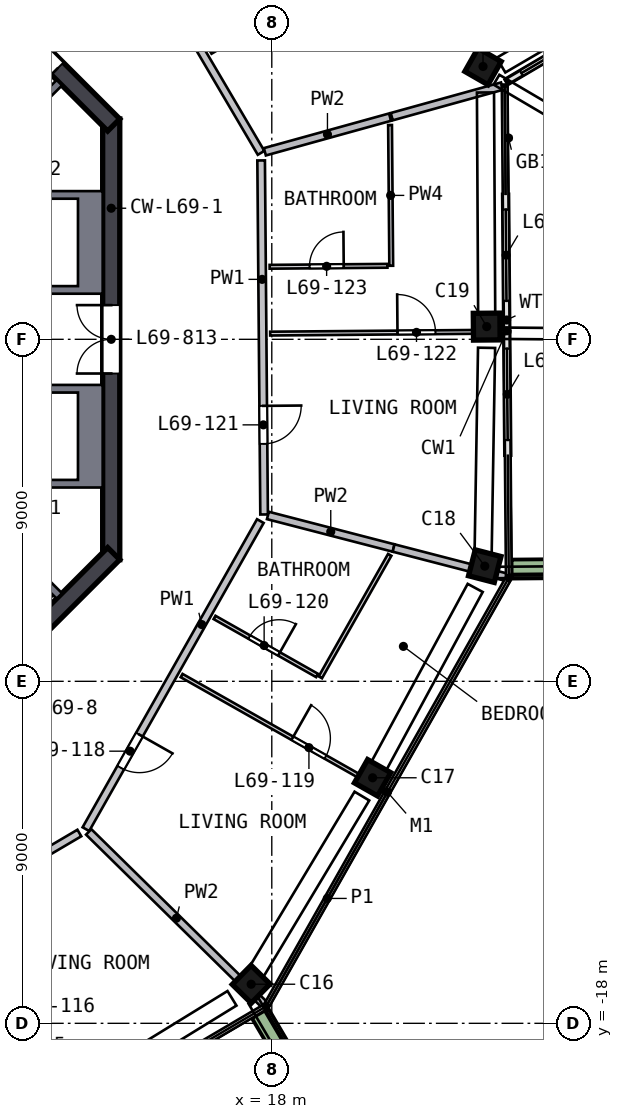
"""IFC4 building model, lengths in metres.
Left out: names, types, materials, properties, quantities, classifications, styles, units other than length and angle.
Written with IfcOpenShell. Run it as: python <this file> out.ifc"""

import sys

from ifc_helpers import new_model, si_unit, direction, frame, frame_2d, origin, origin_2d, place, context, subcontext, project, spatial, polyline, rectangle, outline, extrude, element, fill, save


model = new_model("IFC4")
c1 = context("Model", 3, precision=1e-05, world=origin(), true_north=direction((0.0, 1.0)))
c2 = subcontext(c1, "Body", "Model", "MODEL_VIEW")
j1 = project(units=[si_unit("LENGTHUNIT", "METRE"), si_unit("PLANEANGLEUNIT", "RADIAN")], contexts=[c1])
p1 = place(None, origin())
s1 = spatial("IfcSite", under=j1, at=p1, CompositionType="ELEMENT")
p2 = place(p1, origin())
s2 = spatial("IfcBuilding", under=s1, at=p2, CompositionType="ELEMENT")
p3 = place(p2, frame((0.0, 0.0, 281.0)))
s3 = spatial("IfcBuildingStorey", under=s2, at=p3, CompositionType="ELEMENT", Elevation=281.0)
p4 = place(p3, frame((17.36, -17.072, 0.0), z_axis=(0.080504772, 0.083241478, 0.993272288), x_axis=(-0.696552232, -0.70810012, 0.115798136)))
e1 = element("IfcColumn", 1, at=p4, inside=s3, PredefinedType="COLUMN", context=c2, shape_type="SweptSolid", body=[
    extrude(rectangle(XDim=0.7, YDim=0.7, at=origin_2d()), origin(), (0.0, 0.0, 1.0), 3.211),
])
p5 = place(p3, frame((20.587, -11.657, 0.0), z_axis=(0.054603093, 0.098331196, 0.993654607), x_axis=(0.489744386, 0.864581294, -0.112470541)))
e2 = element("IfcColumn", 2, at=p5, inside=s3, PredefinedType="COLUMN", context=c2, shape_type="SweptSolid", body=[
    extrude(rectangle(XDim=0.7, YDim=0.7, at=origin_2d()), origin(), (0.0, 0.0, 1.0), 3.21),
])
p6 = place(p3, frame((23.57, -6.104, 0.0), z_axis=(0.028051466, 0.112281885, 0.99328037), x_axis=(-0.248925653, -0.96158352, 0.115728794)))
e3 = element("IfcColumn", 3, at=p6, inside=s3, PredefinedType="COLUMN", context=c2, shape_type="SweptSolid", body=[
    extrude(rectangle(XDim=0.7, YDim=0.7, at=origin_2d()), origin(), (0.0, 0.0, 1.0), 3.211),
])
p7 = place(p3, frame((23.657, 0.198, 0.0), z_axis=(-0.001901218, 0.112476061, 0.993652616), x_axis=(-0.008362644, 0.993617878, -0.11248813)))
e4 = element("IfcColumn", 4, at=p7, inside=s3, PredefinedType="COLUMN", context=c2, shape_type="SweptSolid", body=[
    extrude(rectangle(XDim=0.7, YDim=0.7, at=origin_2d()), origin(), (0.0, 0.0, 1.0), 3.21),
])
p8 = place(p3, frame((23.6, 7.044, 0.0), z_axis=(-0.034431763, 0.111884229, 0.993124551), x_axis=(-0.497018974, -0.864033933, 0.080109318)))
e5 = element("IfcColumn", 5, at=p8, inside=s3, PredefinedType="COLUMN", context=c2, shape_type="SweptSolid", body=[
    extrude(rectangle(XDim=0.7, YDim=0.7, at=origin_2d()), origin(), (0.0, 0.0, 1.0), 3.212),
])
p9 = place(p3, frame((13.775, -5.799, 0.0), z_axis=(0.0, 0.0, 1.0), x_axis=(0.0, 1.0, 0.0)))
e6 = element("IfcWall", 6, at=p9, inside=s3, PredefinedType="SHEAR", context=c2, shape_type="SweptSolid", body=[
    extrude(rectangle(XDim=11.598, YDim=0.45, at=frame_2d((5.799, 0.0))), origin(), (0.0, 0.0, 1.0), 3.5),
])
p10 = place(p9, frame((4.899, 0.0, 0.0)))
e7 = element("IfcOpeningElement", 7, at=p10, cuts=e6, PredefinedType="OPENING", context=c2, shape_type="SweptSolid", body=[
    extrude(rectangle(XDim=1.8, YDim=2.1, at=frame_2d((0.9, 1.05))), frame((0.0, 0.235, 0.0), z_axis=(0.0, -1.0, 0.0), x_axis=(1.0, 0.0, 0.0)), (0.0, 0.0, 1.0), 0.47),
])
p11 = place(p3, frame((13.841, 5.64, 0.0), z_axis=(0.0, 0.0, 1.0), x_axis=(-0.707106781, 0.707106781, 0.0)))
e8 = element("IfcWall", 8, at=p11, inside=s3, PredefinedType="SHEAR", context=c2, shape_type="SweptSolid", body=[
    extrude(rectangle(XDim=11.598, YDim=0.45, at=frame_2d((5.799, 0.0))), origin(), (0.0, 0.0, 1.0), 3.5),
])
p12 = place(p11, frame((2.099, 0.0, 0.0)))
e9 = element("IfcOpeningElement", 9, at=p12, cuts=e8, PredefinedType="OPENING", context=c2, shape_type="SweptSolid", body=[
    extrude(rectangle(XDim=1.2, YDim=2.1, at=frame_2d((0.6, 1.05))), frame((0.0, 0.235, 0.0), z_axis=(0.0, -1.0, 0.0), x_axis=(1.0, 0.0, 0.0)), (0.0, 0.0, 1.0), 0.47),
])
p13 = place(p3, frame((5.64, -13.841, 0.0), z_axis=(0.0, 0.0, 1.0), x_axis=(0.707106781, 0.707106781, 0.0)))
e10 = element("IfcWall", 10, at=p13, inside=s3, PredefinedType="SHEAR", context=c2, shape_type="SweptSolid", body=[
    extrude(rectangle(XDim=11.598, YDim=0.45, at=frame_2d((5.799, 0.0))), origin(), (0.0, 0.0, 1.0), 3.5),
])
p14 = place(p13, frame((2.099, 0.0, 0.0)))
e11 = element("IfcOpeningElement", 11, at=p14, cuts=e10, PredefinedType="OPENING", context=c2, shape_type="SweptSolid", body=[
    extrude(rectangle(XDim=1.2, YDim=2.1, at=frame_2d((0.6, 1.05))), frame((0.0, 0.235, 0.0), z_axis=(0.0, -1.0, 0.0), x_axis=(1.0, 0.0, 0.0)), (0.0, 0.0, 1.0), 0.47),
])
p15 = place(p3, frame((24.21, -3.047, 0.0), z_axis=(0.0, 0.0, 1.0), x_axis=(-0.008413164, 0.999964609, 0.0)))
e12 = element("IfcWall", 12, at=p15, inside=s3, PredefinedType="SOLIDWALL", context=c2, shape_type="SweptSolid", body=[
    extrude(rectangle(XDim=3.25, YDim=0.15, at=frame_2d((1.625, 0.0))), origin(), (0.0, 0.0, 1.0), 2.525),
])
p16 = place(p15, frame((0.4, 0.0, 0.0)))
e13 = element("IfcOpeningElement", 13, at=p16, cuts=e12, PredefinedType="OPENING", context=c2, shape_type="SweptSolid", body=[
    extrude(rectangle(XDim=2.4, YDim=2.4, at=frame_2d((1.2, 1.2))), frame((0.0, 0.085, 0.0), z_axis=(0.0, -1.0, 0.0), x_axis=(1.0, 0.0, 0.0)), (0.0, 0.0, 1.0), 0.17),
])
p17 = place(p3, frame((24.182, 0.203, 0.0), z_axis=(0.0, 0.0, 1.0), x_axis=(-0.00831558, 0.999965425, 0.0)))
e14 = element("IfcWall", 14, at=p17, inside=s3, PredefinedType="SOLIDWALL", context=c2, shape_type="SweptSolid", body=[
    extrude(rectangle(XDim=3.611, YDim=0.15, at=frame_2d((1.806, 0.0))), origin(), (0.0, 0.0, 1.0), 2.525),
])
p18 = place(p17, frame((0.811, 0.0, 0.0)))
e15 = element("IfcOpeningElement", 15, at=p18, cuts=e14, PredefinedType="OPENING", context=c2, shape_type="SweptSolid", body=[
    extrude(rectangle(XDim=2.4, YDim=2.4, at=frame_2d((1.2, 1.2))), frame((0.0, 0.085, 0.0), z_axis=(0.0, -1.0, 0.0), x_axis=(1.0, 0.0, 0.0)), (0.0, 0.0, 1.0), 0.17),
])
p19 = place(p3, frame((24.225, 6.803, 0.0), z_axis=(0.0, 0.0, 1.0), x_axis=(0.861824362, 0.507206831, 0.0)))
e16 = element("IfcWall", 16, at=p19, inside=s3, PredefinedType="SOLIDWALL", context=c2, shape_type="SweptSolid", body=[
    extrude(rectangle(XDim=3.2, YDim=0.15, at=frame_2d((1.6, 0.0))), origin(), (0.0, 0.0, 1.0), 2.525),
])
p20 = place(p19, frame((0.4, 0.0, 0.0)))
e17 = element("IfcOpeningElement", 17, at=p20, cuts=e16, PredefinedType="OPENING", context=c2, shape_type="SweptSolid", body=[
    extrude(rectangle(XDim=2.4, YDim=2.4, at=frame_2d((1.2, 1.2))), frame((0.0, 0.085, 0.0), z_axis=(0.0, -1.0, 0.0), x_axis=(1.0, 0.0, 0.0)), (0.0, 0.0, 1.0), 0.17),
])
p21 = place(p3, frame((19.061, -20.063, 0.0), z_axis=(0.0, 0.0, 1.0), x_axis=(-0.507174285, 0.861843515, 0.0)))
e18 = element("IfcWall", 18, at=p21, inside=s3, PredefinedType="SOLIDWALL", context=c2, shape_type="SweptSolid", body=[
    extrude(rectangle(XDim=2.699, YDim=0.5, at=frame_2d((1.35, 0.0))), origin(), (0.0, 0.0, 1.0), 0.7),
])
p22 = place(p3, frame((24.311, -6.047, 0.0), z_axis=(0.0, 0.0, 1.0), x_axis=(0.999964764, 0.008394728, 0.0)))
e19 = element("IfcWall", 19, at=p22, inside=s3, PredefinedType="SOLIDWALL", context=c2, shape_type="SweptSolid", body=[
    extrude(rectangle(XDim=3.199, YDim=0.5, at=frame_2d((1.6, 0.0))), origin(), (0.0, 0.0, 1.0), 0.7),
])
p23 = place(p3, origin())
e20 = element("IfcWall", 20, at=p23, inside=s3, PredefinedType="SOLIDWALL", context=c2, shape_type="SweptSolid", body=[
    extrude(outline(polyline([(13.55, -3.9), (9.9, -3.9), (9.9, -3.7), (12.9, -3.7), (12.9, -1.4), (9.9, -1.4), (9.9, -1.2), (13.55, -1.2), (13.55, -3.9)])), origin(), (0.0, 0.0, 1.0), 3.19),
])
p24 = place(p3, origin())
e21 = element("IfcWall", 21, at=p24, inside=s3, PredefinedType="SOLIDWALL", context=c2, shape_type="SweptSolid", body=[
    extrude(outline(polyline([(13.55, 3.9), (13.55, 1.2), (9.9, 1.2), (9.9, 1.4), (12.9, 1.4), (12.9, 3.7), (9.9, 3.7), (9.9, 3.9), (13.55, 3.9)])), origin(), (0.0, 0.0, 1.0), 3.19),
])
for number, where, z_axis, x_axis in (
    (22, (9.334, 3.677, 0.0), (0.0, 0.0, 1.0), (0.707, 0.707, 0.0)),
    (23, (9.334, -3.677, 0.0), (0.0, 0.0, 1.0), (0.707, -0.707, 0.0)),
):
    element("IfcWall", number, at=place(p3, frame(where, z_axis=z_axis, x_axis=x_axis)), inside=s3, PredefinedType="SOLIDWALL", context=c2, shape_type="SweptSolid", body=[
        extrude(rectangle(XDim=4.35, YDim=0.2, at=frame_2d((2.175, 0.0))), origin(), (0.0, 0.0, 1.0), 3.19),
    ])
p25 = place(p3, frame((12.936, -12.992, 0.0), z_axis=(0.0, 0.0, 1.0), x_axis=(-0.861805451, -0.507238962, 0.0)))
e24 = element("IfcWall", 24, at=p25, inside=s3, PredefinedType="SOLIDWALL", context=c2, shape_type="SweptSolid", body=[
    extrude(rectangle(XDim=9.116, YDim=0.2, at=frame_2d((4.558, 0.0))), origin(), (0.0, 0.0, 1.0), 3.19),
])
p26 = place(p25, frame((1.7, 0.0, 0.0)))
e25 = element("IfcOpeningElement", 25, at=p26, cuts=e24, PredefinedType="OPENING", context=c2, shape_type="SweptSolid", body=[
    extrude(rectangle(XDim=1.0, YDim=2.1, at=frame_2d((0.5, 1.05))), frame((0.0, 0.11, 0.0), z_axis=(0.0, -1.0, 0.0), x_axis=(1.0, 0.0, 0.0)), (0.0, 0.0, 1.0), 0.22),
])
p27 = place(p3, frame((12.891, 13.108, 0.0), z_axis=(0.0, 0.0, 1.0), x_axis=(0.507237612, -0.861806246, 0.0)))
e26 = element("IfcWall", 26, at=p27, inside=s3, PredefinedType="SOLIDWALL", context=c2, shape_type="SweptSolid", body=[
    extrude(rectangle(XDim=9.517, YDim=0.2, at=frame_2d((4.758, 0.0))), origin(), (0.0, 0.0, 1.0), 3.19),
])
p28 = place(p27, frame((3.866, 0.0, 0.0)))
e27 = element("IfcOpeningElement", 27, at=p28, cuts=e26, PredefinedType="OPENING", context=c2, shape_type="SweptSolid", body=[
    extrude(rectangle(XDim=1.8, YDim=2.1, at=frame_2d((0.9, 1.05))), frame((0.0, 0.11, 0.0), z_axis=(0.0, -1.0, 0.0), x_axis=(1.0, 0.0, 0.0)), (0.0, 0.0, 1.0), 0.22),
])
p29 = place(p3, frame((17.699, -4.783, 0.0), z_axis=(0.0, 0.0, 1.0), x_axis=(-0.492728899, -0.870182873, 0.0)))
e28 = element("IfcWall", 28, at=p29, inside=s3, PredefinedType="SOLIDWALL", context=c2, shape_type="SweptSolid", body=[
    extrude(rectangle(XDim=9.317, YDim=0.2, at=frame_2d((4.658, 0.0))), origin(), (0.0, 0.0, 1.0), 3.19),
])
p30 = place(p29, frame((6.458, 0.0, 0.0)))
e29 = element("IfcOpeningElement", 29, at=p30, cuts=e28, PredefinedType="OPENING", context=c2, shape_type="SweptSolid", body=[
    extrude(rectangle(XDim=1.0, YDim=2.1, at=frame_2d((0.5, 1.05))), frame((0.0, 0.11, 0.0), z_axis=(0.0, -1.0, 0.0), x_axis=(1.0, 0.0, 0.0)), (0.0, 0.0, 1.0), 0.22),
])
p31 = place(p3, frame((17.719, 4.707, 0.0), z_axis=(0.0, 0.0, 1.0), x_axis=(0.008385669, -0.99996484, 0.0)))
e30 = element("IfcWall", 30, at=p31, inside=s3, PredefinedType="SOLIDWALL", context=c2, shape_type="SweptSolid", body=[
    extrude(rectangle(XDim=9.316, YDim=0.2, at=frame_2d((4.658, 0.0))), origin(), (0.0, 0.0, 1.0), 3.19),
])
p32 = place(p31, frame((6.458, 0.0, 0.0)))
e31 = element("IfcOpeningElement", 31, at=p32, cuts=e30, PredefinedType="OPENING", context=c2, shape_type="SweptSolid", body=[
    extrude(rectangle(XDim=1.0, YDim=2.1, at=frame_2d((0.5, 1.05))), frame((0.0, 0.11, 0.0), z_axis=(0.0, -1.0, 0.0), x_axis=(1.0, 0.0, 0.0)), (0.0, 0.0, 1.0), 0.22),
])
p33 = place(p3, frame((13.182, -12.963, 0.0), z_axis=(0.0, 0.0, 1.0), x_axis=(0.712982214, -0.701182118, 0.0)))
e32 = element("IfcWall", 32, at=p33, inside=s3, PredefinedType="SOLIDWALL", context=c2, shape_type="SweptSolid", body=[
    extrude(rectangle(XDim=6.476, YDim=0.2, at=frame_2d((3.238, 0.0))), origin(), (0.0, 0.0, 1.0), 3.19),
])
p34 = place(p3, frame((21.112, 5.847, 0.0), z_axis=(0.0, 0.0, 1.0), x_axis=(-0.963726348, -0.266892349, 0.0)))
e33 = element("IfcWall", 33, at=p34, inside=s3, PredefinedType="SOLIDWALL", context=c2, shape_type="SweptSolid", body=[
    extrude(rectangle(XDim=3.418, YDim=0.2, at=frame_2d((1.709, 0.0))), origin(), (0.0, 0.0, 1.0), 3.19),
])
p35 = place(p3, frame((17.898, -4.635, 0.0), z_axis=(0.0, 0.0, 1.0), x_axis=(0.968052168, -0.250748879, 0.0)))
e34 = element("IfcWall", 34, at=p35, inside=s3, PredefinedType="SOLIDWALL", context=c2, shape_type="SweptSolid", body=[
    extrude(rectangle(XDim=3.417, YDim=0.2, at=frame_2d((1.708, 0.0))), origin(), (0.0, 0.0, 1.0), 3.19),
])
p36 = place(p3, frame((25.199, 12.802, 0.0), z_axis=(0.0, 0.0, 1.0), x_axis=(-0.861805628, -0.507238661, 0.0)))
e35 = element("IfcWall", 35, at=p36, inside=s3, PredefinedType="SOLIDWALL", context=c2, shape_type="SweptSolid", body=[
    extrude(rectangle(XDim=10.252, YDim=0.2, at=frame_2d((5.126, 0.0))), origin(), (0.0, 0.0, 1.0), 3.19),
])
p37 = place(p36, frame((2.45, 0.0, 0.0)))
e36 = element("IfcOpeningElement", 36, at=p37, cuts=e35, PredefinedType="OPENING", context=c2, shape_type="SweptSolid", body=[
    extrude(rectangle(XDim=1.0, YDim=2.1, at=frame_2d((0.5, 1.05))), frame((0.0, 0.11, 0.0), z_axis=(0.0, -1.0, 0.0), x_axis=(1.0, 0.0, 0.0)), (0.0, 0.0, 1.0), 0.22),
])
p38 = place(p3, frame((24.059, 6.663, 0.0), z_axis=(0.0, 0.0, 1.0), x_axis=(-0.963710452, -0.266949741, 0.0)))
e37 = element("IfcWall", 37, at=p38, inside=s3, PredefinedType="SOLIDWALL", context=c2, shape_type="SweptSolid", body=[
    extrude(rectangle(XDim=3.012, YDim=0.2, at=frame_2d((1.506, 0.0))), origin(), (0.0, 0.0, 1.0), 3.19),
])
p39 = place(p3, frame((21.205, -5.492, 0.0), z_axis=(0.0, 0.0, 1.0), x_axis=(0.968075831, -0.250657504, 0.0)))
e38 = element("IfcWall", 38, at=p39, inside=s3, PredefinedType="SOLIDWALL", context=c2, shape_type="SweptSolid", body=[
    extrude(rectangle(XDim=3.059, YDim=0.2, at=frame_2d((1.53, 0.0))), origin(), (0.0, 0.0, 1.0), 3.19),
])
p40 = place(p3, frame((12.229, -20.777, 0.0), z_axis=(0.0, 0.0, 1.0), x_axis=(-0.507256048, 0.861795394, 0.0)))
e39 = element("IfcWall", 39, at=p40, inside=s3, PredefinedType="PARTITIONING", context=c2, shape_type="SweptSolid", body=[
    extrude(rectangle(XDim=6.15, YDim=0.1, at=frame_2d((3.075, 0.0))), origin(), (0.0, 0.0, 1.0), 3.19),
])
p41 = place(p40, frame((1.8, 0.0, 0.0)))
e40 = element("IfcOpeningElement", 40, at=p41, cuts=e39, PredefinedType="OPENING", context=c2, shape_type="SweptSolid", body=[
    extrude(rectangle(XDim=1.0, YDim=2.1, at=frame_2d((0.5, 1.05))), frame((0.0, 0.06, 0.0), z_axis=(0.0, -1.0, 0.0), x_axis=(1.0, 0.0, 0.0)), (0.0, 0.0, 1.0), 0.12),
])
p42 = place(p3, frame((16.493, -7.319, 0.0), z_axis=(0.0, 0.0, 1.0), x_axis=(0.870194419, -0.492708506, 0.0)))
e41 = element("IfcWall", 41, at=p42, inside=s3, PredefinedType="PARTITIONING", context=c2, shape_type="SweptSolid", body=[
    extrude(rectangle(XDim=3.1, YDim=0.1, at=frame_2d((1.55, 0.0))), origin(), (0.0, 0.0, 1.0), 3.19),
])
p43 = place(p42, frame((1.05, 0.0, 0.0)))
e42 = element("IfcOpeningElement", 42, at=p43, cuts=e41, PredefinedType="OPENING", context=c2, shape_type="SweptSolid", body=[
    extrude(rectangle(XDim=0.9, YDim=2.1, at=frame_2d((0.45, 1.05))), frame((0.0, 0.06, 0.0), z_axis=(0.0, -1.0, 0.0), x_axis=(1.0, 0.0, 0.0)), (0.0, 0.0, 1.0), 0.12),
])
p44 = place(p3, frame((15.627, -8.849, 0.0), z_axis=(0.0, 0.0, 1.0), x_axis=(0.870190704, -0.492715069, 0.0)))
e43 = element("IfcWall", 43, at=p44, inside=s3, PredefinedType="PARTITIONING", context=c2, shape_type="SweptSolid", body=[
    extrude(rectangle(XDim=6.15, YDim=0.1, at=frame_2d((3.075, 0.0))), origin(), (0.0, 0.0, 1.0), 3.19),
])
p45 = place(p44, frame((3.35, 0.0, 0.0)))
e44 = element("IfcOpeningElement", 44, at=p45, cuts=e43, PredefinedType="OPENING", context=c2, shape_type="SweptSolid", body=[
    extrude(rectangle(XDim=1.0, YDim=2.1, at=frame_2d((0.5, 1.05))), frame((0.0, 0.06, 0.0), z_axis=(0.0, -1.0, 0.0), x_axis=(1.0, 0.0, 0.0)), (0.0, 0.0, 1.0), 0.12),
])
p46 = place(p3, frame((17.943, 1.909, 0.0), z_axis=(0.0, 0.0, 1.0), x_axis=(0.999964493, 0.008426888, 0.0)))
e45 = element("IfcWall", 45, at=p46, inside=s3, PredefinedType="PARTITIONING", context=c2, shape_type="SweptSolid", body=[
    extrude(rectangle(XDim=3.1, YDim=0.1, at=frame_2d((1.55, 0.0))), origin(), (0.0, 0.0, 1.0), 3.19),
])
p47 = place(p46, frame((1.05, 0.0, 0.0)))
e46 = element("IfcOpeningElement", 46, at=p47, cuts=e45, PredefinedType="OPENING", context=c2, shape_type="SweptSolid", body=[
    extrude(rectangle(XDim=0.9, YDim=2.1, at=frame_2d((0.45, 1.05))), frame((0.0, 0.06, 0.0), z_axis=(0.0, -1.0, 0.0), x_axis=(1.0, 0.0, 0.0)), (0.0, 0.0, 1.0), 0.12),
])
p48 = place(p3, frame((19.278, -8.895, 0.0), z_axis=(0.0, 0.0, 1.0), x_axis=(0.492706532, 0.870195537, 0.0)))
e47 = element("IfcWall", 47, at=p48, inside=s3, PredefinedType="PARTITIONING", context=c2, shape_type="SweptSolid", body=[
    extrude(rectangle(XDim=3.704, YDim=0.1, at=frame_2d((1.852, 0.0))), origin(), (0.0, 0.0, 1.0), 3.19),
])
p49 = place(p3, frame((17.958, 0.15, 0.0), z_axis=(0.0, 0.0, 1.0), x_axis=(0.999964918, 0.008376378, 0.0)))
e48 = element("IfcWall", 48, at=p49, inside=s3, PredefinedType="PARTITIONING", context=c2, shape_type="SweptSolid", body=[
    extrude(rectangle(XDim=6.15, YDim=0.1, at=frame_2d((3.075, 0.0))), origin(), (0.0, 0.0, 1.0), 3.19),
])
p50 = place(p49, frame((3.35, 0.0, 0.0)))
e49 = element("IfcOpeningElement", 49, at=p50, cuts=e48, PredefinedType="OPENING", context=c2, shape_type="SweptSolid", body=[
    extrude(rectangle(XDim=1.0, YDim=2.1, at=frame_2d((0.5, 1.05))), frame((0.0, 0.06, 0.0), z_axis=(0.0, -1.0, 0.0), x_axis=(1.0, 0.0, 0.0)), (0.0, 0.0, 1.0), 0.12),
])
p51 = place(p3, frame((21.143, 1.936, 0.0), z_axis=(0.0, 0.0, 1.0), x_axis=(-0.008370941, 0.999964963, 0.0)))
e50 = element("IfcWall", 50, at=p51, inside=s3, PredefinedType="PARTITIONING", context=c2, shape_type="SweptSolid", body=[
    extrude(rectangle(XDim=3.704, YDim=0.1, at=frame_2d((1.852, 0.0))), origin(), (0.0, 0.0, 1.0), 3.19),
])
p52 = place(p16, origin())
e51 = element("IfcDoor", 51, at=p52, inside=s3, OperationType="SLIDING_TO_RIGHT", PredefinedType="DOOR", context=c2, shape_type="SweptSolid", body=[
    extrude(rectangle(XDim=2.4, YDim=2.4, at=frame_2d((1.2, 1.2))), frame((0.0, 0.025, 0.0), z_axis=(0.0, -1.0, 0.0), x_axis=(1.0, 0.0, 0.0)), (0.0, 0.0, 1.0), 0.05),
])
fill(e13, e51)
p53 = place(p18, origin())
e52 = element("IfcDoor", 52, at=p53, inside=s3, OperationType="SLIDING_TO_LEFT", PredefinedType="DOOR", context=c2, shape_type="SweptSolid", body=[
    extrude(rectangle(XDim=2.4, YDim=2.4, at=frame_2d((1.2, 1.2))), frame((0.0, 0.025, 0.0), z_axis=(0.0, -1.0, 0.0), x_axis=(1.0, 0.0, 0.0)), (0.0, 0.0, 1.0), 0.05),
])
fill(e15, e52)
p54 = place(p20, origin())
e53 = element("IfcDoor", 53, at=p54, inside=s3, OperationType="SLIDING_TO_LEFT", PredefinedType="DOOR", context=c2, shape_type="SweptSolid", body=[
    extrude(rectangle(XDim=2.4, YDim=2.4, at=frame_2d((1.2, 1.2))), frame((0.0, 0.025, 0.0), z_axis=(0.0, -1.0, 0.0), x_axis=(1.0, 0.0, 0.0)), (0.0, 0.0, 1.0), 0.05),
])
fill(e17, e53)
p55 = place(p10, origin())
e54 = element("IfcDoor", 54, at=p55, inside=s3, OperationType="DOUBLE_DOOR_SINGLE_SWING", PredefinedType="DOOR", context=c2, shape_type="SweptSolid", body=[
    extrude(rectangle(XDim=1.8, YDim=2.1, at=frame_2d((0.9, 1.05))), frame((0.0, 0.025, 0.0), z_axis=(0.0, -1.0, 0.0), x_axis=(1.0, 0.0, 0.0)), (0.0, 0.0, 1.0), 0.05),
])
fill(e7, e54)
p56 = place(p12, origin())
e55 = element("IfcDoor", 55, at=p56, inside=s3, OperationType="SINGLE_SWING_LEFT", PredefinedType="DOOR", context=c2, shape_type="SweptSolid", body=[
    extrude(rectangle(XDim=1.2, YDim=2.1, at=frame_2d((0.6, 1.05))), frame((0.0, 0.025, 0.0), z_axis=(0.0, -1.0, 0.0), x_axis=(1.0, 0.0, 0.0)), (0.0, 0.0, 1.0), 0.05),
])
fill(e9, e55)
p57 = place(p30, origin())
e56 = element("IfcDoor", 56, at=p57, inside=s3, OperationType="SINGLE_SWING_LEFT", PredefinedType="DOOR", context=c2, shape_type="SweptSolid", body=[
    extrude(rectangle(XDim=1.0, YDim=2.1, at=frame_2d((0.5, 1.05))), frame((0.0, 0.025, 0.0), z_axis=(0.0, -1.0, 0.0), x_axis=(1.0, 0.0, 0.0)), (0.0, 0.0, 1.0), 0.05),
])
fill(e29, e56)
p58 = place(p45, origin())
e57 = element("IfcDoor", 57, at=p58, inside=s3, OperationType="SINGLE_SWING_LEFT", PredefinedType="DOOR", context=c2, shape_type="SweptSolid", body=[
    extrude(rectangle(XDim=1.0, YDim=2.1, at=frame_2d((0.5, 1.05))), frame((0.0, 0.025, 0.0), z_axis=(0.0, -1.0, 0.0), x_axis=(1.0, 0.0, 0.0)), (0.0, 0.0, 1.0), 0.05),
])
fill(e44, e57)
p59 = place(p43, origin())
e58 = element("IfcDoor", 58, at=p59, inside=s3, OperationType="SINGLE_SWING_RIGHT", PredefinedType="DOOR", context=c2, shape_type="SweptSolid", body=[
    extrude(rectangle(XDim=0.9, YDim=2.1, at=frame_2d((0.45, 1.05))), frame((0.0, 0.025, 0.0), z_axis=(0.0, -1.0, 0.0), x_axis=(1.0, 0.0, 0.0)), (0.0, 0.0, 1.0), 0.05),
])
fill(e42, e58)
p60 = place(p32, origin())
e59 = element("IfcDoor", 59, at=p60, inside=s3, OperationType="SINGLE_SWING_LEFT", PredefinedType="DOOR", context=c2, shape_type="SweptSolid", body=[
    extrude(rectangle(XDim=1.0, YDim=2.1, at=frame_2d((0.5, 1.05))), frame((0.0, 0.025, 0.0), z_axis=(0.0, -1.0, 0.0), x_axis=(1.0, 0.0, 0.0)), (0.0, 0.0, 1.0), 0.05),
])
fill(e31, e59)
p61 = place(p50, origin())
e60 = element("IfcDoor", 60, at=p61, inside=s3, OperationType="SINGLE_SWING_LEFT", PredefinedType="DOOR", context=c2, shape_type="SweptSolid", body=[
    extrude(rectangle(XDim=1.0, YDim=2.1, at=frame_2d((0.5, 1.05))), frame((0.0, 0.025, 0.0), z_axis=(0.0, -1.0, 0.0), x_axis=(1.0, 0.0, 0.0)), (0.0, 0.0, 1.0), 0.05),
])
fill(e49, e60)
p62 = place(p47, origin())
e61 = element("IfcDoor", 61, at=p62, inside=s3, OperationType="SINGLE_SWING_RIGHT", PredefinedType="DOOR", context=c2, shape_type="SweptSolid", body=[
    extrude(rectangle(XDim=0.9, YDim=2.1, at=frame_2d((0.45, 1.05))), frame((0.0, 0.025, 0.0), z_axis=(0.0, -1.0, 0.0), x_axis=(1.0, 0.0, 0.0)), (0.0, 0.0, 1.0), 0.05),
])
fill(e46, e61)
save(model, sys.argv[1])
